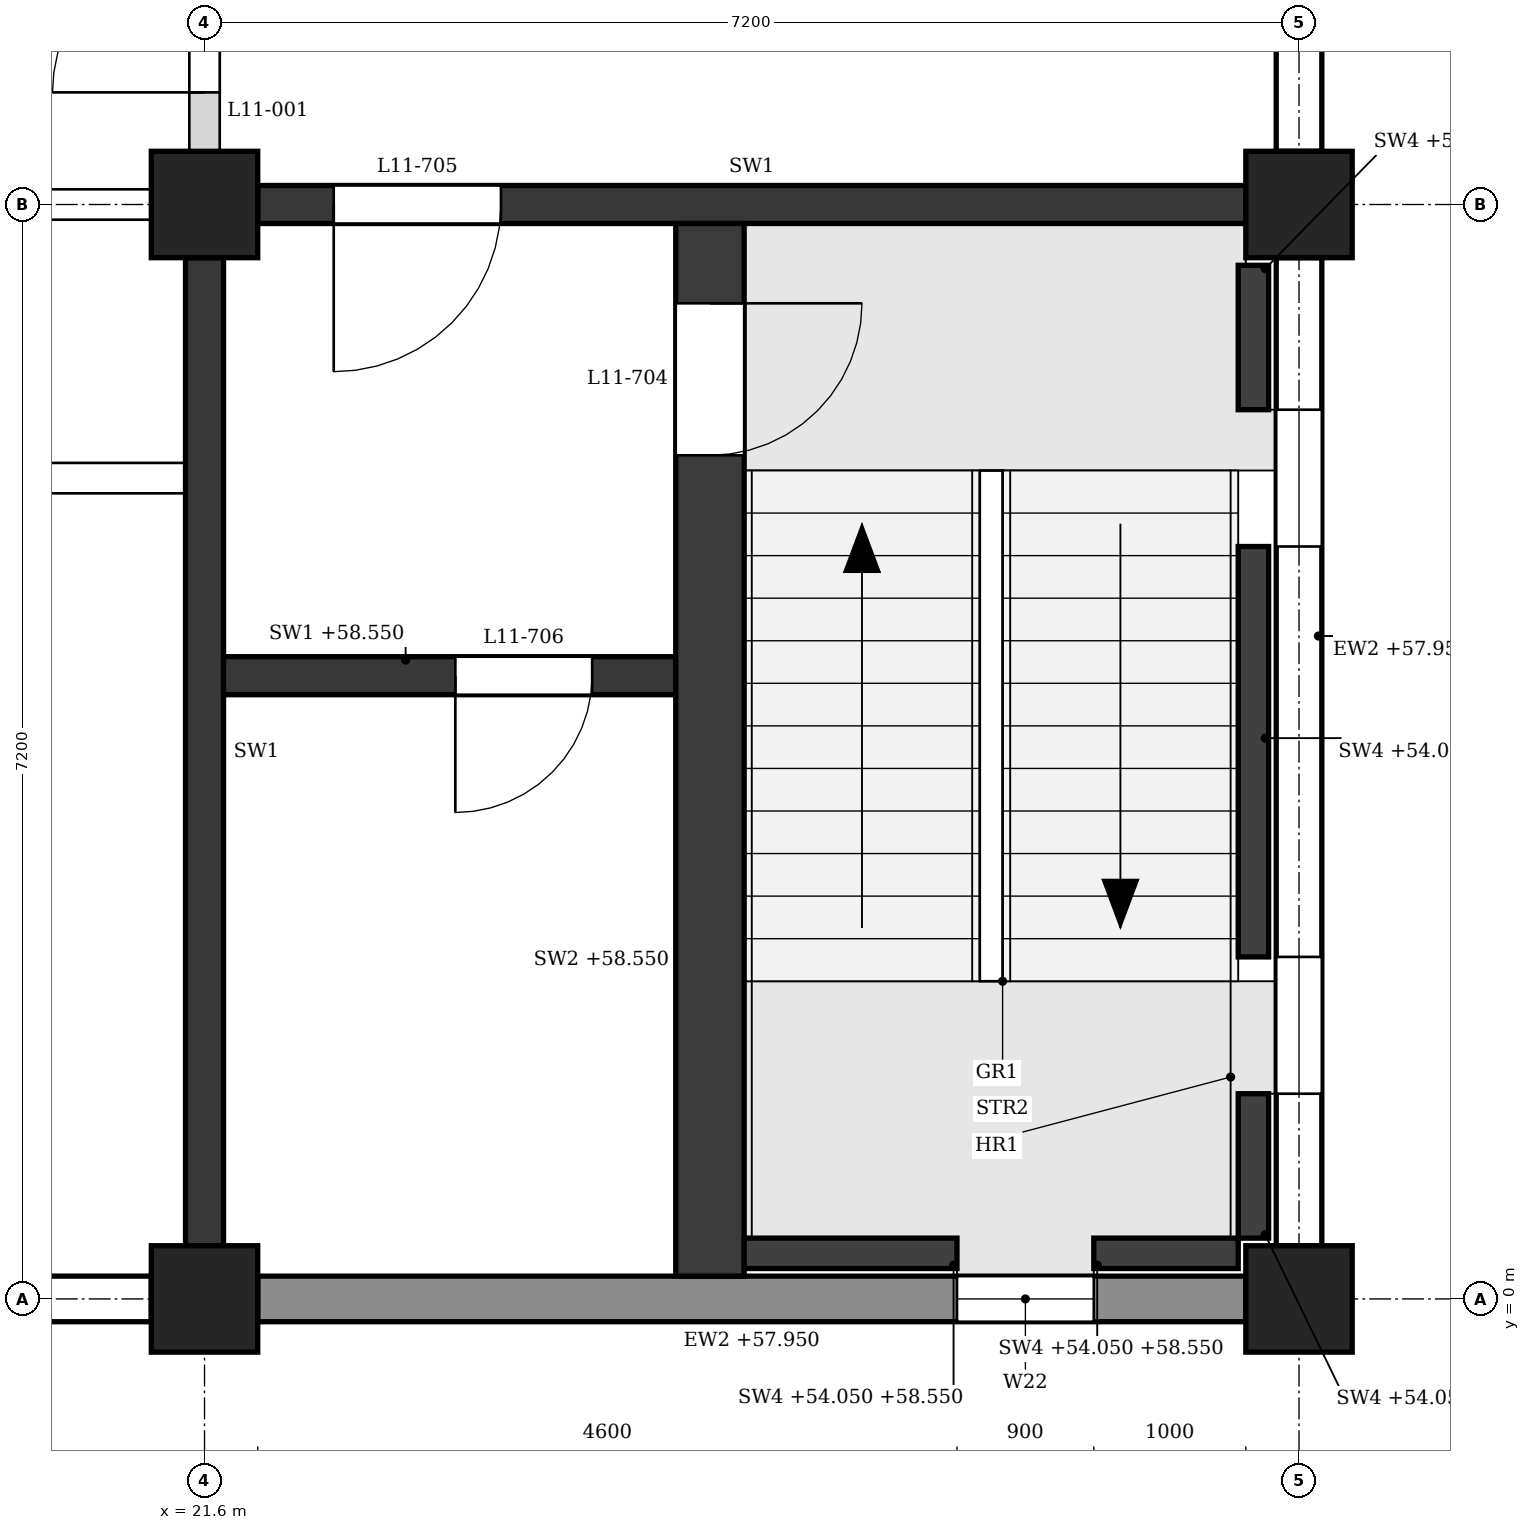
"""IFC4 building model, lengths in metres.
Left out: names, types, materials, properties, quantities, classifications, styles, units other than length and angle.
Written with IfcOpenShell. Run it as: python <this file> out.ifc"""

import sys

from ifc_helpers import new_model, si_unit, direction, frame, frame_2d, origin, origin_2d, place, context, subcontext, project, spatial, polyline, rectangle, outline, extrude, element, fill, save


model = new_model("IFC4")
c1 = context("Model", 3, precision=1e-05, world=origin(), true_north=direction((0.0, 1.0)))
c2 = subcontext(c1, "Body", "Model", "MODEL_VIEW")
j1 = project(units=[si_unit("LENGTHUNIT", "METRE"), si_unit("PLANEANGLEUNIT", "RADIAN")], contexts=[c1])
p1 = place(None, origin())
s1 = spatial("IfcSite", under=j1, at=p1, CompositionType="ELEMENT")
p2 = place(p1, origin())
s2 = spatial("IfcBuilding", under=s1, at=p2, CompositionType="ELEMENT")
p3 = place(p2, frame((0.0, 0.0, 54.3)))
s3 = spatial("IfcBuildingStorey", under=s2, at=p3, CompositionType="ELEMENT", Elevation=54.3)
for number, where, z_axis, x_axis in (
    (1, (21.6, 0.0, 0.0), (0.0, 0.0, 1.0), (1.0, 0.0, 0.0)),
    (2, (21.6, 7.2, 0.0), (0.0, 0.0, 1.0), (1.0, 0.0, 0.0)),
    (3, (28.8, 0.0, 0.0), (0.0, 0.0, 1.0), (1.0, 0.0, 0.0)),
    (4, (28.8, 7.2, 0.0), (0.0, 0.0, 1.0), (1.0, 0.0, 0.0)),
):
    element("IfcColumn", number, at=place(p3, frame(where, z_axis=z_axis, x_axis=x_axis)), inside=s3, PredefinedType="COLUMN", context=c2, shape_type="SweptSolid", body=[
        extrude(rectangle(XDim=0.7, YDim=0.7, at=origin_2d()), origin(), (0.0, 0.0, 1.0), 4.5),
    ])
p4 = place(p3, frame((14.75, 0.0, 0.0), z_axis=(0.0, 0.0, 1.0), x_axis=(1.0, 0.0, 0.0)))
e5 = element("IfcWall", 5, at=p4, inside=s3, PredefinedType="STANDARD", context=c2, shape_type="SweptSolid", body=[
    extrude(rectangle(XDim=6.5, YDim=0.3, at=frame_2d((3.25, 0.0))), origin(), (0.0, 0.0, 1.0), 3.65),
])
p5 = place(p4, frame((0.7, 0.0, 0.9)))
e6 = element("IfcOpeningElement", 6, at=p5, cuts=e5, PredefinedType="OPENING", context=c2, shape_type="SweptSolid", body=[
    extrude(outline(polyline([(0.0, 0.0), (1.5, 0.0), (1.5, 1.95), (0.75, 2.7), (0.0, 1.95), (0.0, 0.0)])), frame((0.0, 0.16, 0.0), z_axis=(0.0, -1.0, 0.0), x_axis=(1.0, 0.0, 0.0)), (0.0, 0.0, 1.0), 0.32),
])
p6 = place(p4, frame((4.3, 0.0, 0.9)))
e7 = element("IfcOpeningElement", 7, at=p6, cuts=e5, PredefinedType="OPENING", context=c2, shape_type="SweptSolid", body=[
    extrude(outline(polyline([(0.0, 0.0), (1.5, 0.0), (1.5, 1.95), (0.75, 2.7), (0.0, 1.95), (0.0, 0.0)])), frame((0.0, 0.16, 0.0), z_axis=(0.0, -1.0, 0.0), x_axis=(1.0, 0.0, 0.0)), (0.0, 0.0, 1.0), 0.32),
])
p7 = place(p3, frame((21.95, 0.0, 0.0), z_axis=(0.0, 0.0, 1.0), x_axis=(1.0, 0.0, 0.0)))
e8 = element("IfcWall", 8, at=p7, inside=s3, PredefinedType="STANDARD", context=c2, shape_type="SweptSolid", body=[
    extrude(rectangle(XDim=6.5, YDim=0.3, at=frame_2d((3.25, 0.0))), origin(), (0.0, 0.0, 1.0), 3.65),
])
p8 = place(p7, frame((4.6, 0.0, 0.9)))
e9 = element("IfcOpeningElement", 9, at=p8, cuts=e8, PredefinedType="OPENING", context=c2, shape_type="SweptSolid", body=[
    extrude(outline(polyline([(0.0, 0.0), (0.9, 0.0), (0.9, 2.25), (0.45, 2.7), (0.0, 2.25), (0.0, 0.0)])), frame((0.0, 0.16, 0.0), z_axis=(0.0, -1.0, 0.0), x_axis=(1.0, 0.0, 0.0)), (0.0, 0.0, 1.0), 0.32),
])
p9 = place(p3, frame((28.8, 0.35, 0.0), z_axis=(0.0, 0.0, 1.0), x_axis=(0.0, 1.0, 0.0)))
e10 = element("IfcWall", 10, at=p9, inside=s3, PredefinedType="STANDARD", context=c2, shape_type="SweptSolid", body=[
    extrude(rectangle(XDim=6.5, YDim=0.3, at=frame_2d((3.25, 0.0))), origin(), (0.0, 0.0, 1.0), 3.65),
])
p10 = place(p9, frame((1.0, 0.0, 0.9)))
e11 = element("IfcOpeningElement", 11, at=p10, cuts=e10, PredefinedType="OPENING", context=c2, shape_type="SweptSolid", body=[
    extrude(outline(polyline([(0.0, 0.0), (0.9, 0.0), (0.9, 2.25), (0.45, 2.7), (0.0, 2.25), (0.0, 0.0)])), frame((0.0, 0.16, 0.0), z_axis=(0.0, -1.0, 0.0), x_axis=(1.0, 0.0, 0.0)), (0.0, 0.0, 1.0), 0.32),
])
p11 = place(p9, frame((4.6, 0.0, 0.9)))
e12 = element("IfcOpeningElement", 12, at=p11, cuts=e10, PredefinedType="OPENING", context=c2, shape_type="SweptSolid", body=[
    extrude(outline(polyline([(0.0, 0.0), (0.9, 0.0), (0.9, 2.25), (0.45, 2.7), (0.0, 2.25), (0.0, 0.0)])), frame((0.0, 0.16, 0.0), z_axis=(0.0, -1.0, 0.0), x_axis=(1.0, 0.0, 0.0)), (0.0, 0.0, 1.0), 0.32),
])
p12 = place(p3, frame((28.8, 7.55, 0.0), z_axis=(0.0, 0.0, 1.0), x_axis=(0.0, 1.0, 0.0)))
e13 = element("IfcWall", 13, at=p12, inside=s3, PredefinedType="STANDARD", context=c2, shape_type="SweptSolid", body=[
    extrude(rectangle(XDim=6.5, YDim=0.3, at=frame_2d((3.25, 0.0))), origin(), (0.0, 0.0, 1.0), 3.65),
])
p13 = place(p12, frame((0.7, 0.0, 0.9)))
e14 = element("IfcOpeningElement", 14, at=p13, cuts=e13, PredefinedType="OPENING", context=c2, shape_type="SweptSolid", body=[
    extrude(outline(polyline([(0.0, 0.0), (1.5, 0.0), (1.5, 1.95), (0.75, 2.7), (0.0, 1.95), (0.0, 0.0)])), frame((0.0, 0.16, 0.0), z_axis=(0.0, -1.0, 0.0), x_axis=(1.0, 0.0, 0.0)), (0.0, 0.0, 1.0), 0.32),
])
p14 = place(p3, frame((21.95, 7.2, 0.0), z_axis=(0.0, 0.0, 1.0), x_axis=(1.0, 0.0, 0.0)))
e15 = element("IfcWall", 15, at=p14, inside=s3, PredefinedType="SHEAR", context=c2, shape_type="SweptSolid", body=[
    extrude(rectangle(XDim=6.5, YDim=0.25, at=frame_2d((3.25, 0.0))), origin(), (0.0, 0.0, 1.0), 3.55),
])
p15 = place(p14, frame((0.5, 0.0, 0.0)))
e16 = element("IfcOpeningElement", 16, at=p15, cuts=e15, PredefinedType="OPENING", context=c2, shape_type="SweptSolid", body=[
    extrude(rectangle(XDim=1.1, YDim=2.1, at=frame_2d((0.55, 1.05))), frame((0.0, 0.135, 0.0), z_axis=(0.0, -1.0, 0.0), x_axis=(1.0, 0.0, 0.0)), (0.0, 0.0, 1.0), 0.27),
])
p16 = place(p3, frame((21.6, 0.35, 0.0), z_axis=(0.0, 0.0, 1.0), x_axis=(0.0, 1.0, 0.0)))
e17 = element("IfcWall", 17, at=p16, inside=s3, PredefinedType="SHEAR", context=c2, shape_type="SweptSolid", body=[
    extrude(rectangle(XDim=6.5, YDim=0.25, at=frame_2d((3.25, 0.0))), origin(), (0.0, 0.0, 1.0), 3.55),
])
p17 = place(p3, frame((28.5, 0.4, -0.25), z_axis=(0.0, 0.0, 1.0), x_axis=(0.0, 1.0, 0.0)))
e18 = element("IfcWall", 18, at=p17, inside=s3, PredefinedType="SHEAR", context=c2, shape_type="SweptSolid", body=[
    extrude(rectangle(XDim=0.95, YDim=0.2, at=frame_2d((0.475, 0.0))), origin(), (0.0, 0.0, 1.0), 4.5),
])
p18 = place(p3, frame((28.5, 2.25, -0.25), z_axis=(0.0, 0.0, 1.0), x_axis=(0.0, 1.0, 0.0)))
e19 = element("IfcWall", 19, at=p18, inside=s3, PredefinedType="SHEAR", context=c2, shape_type="SweptSolid", body=[
    extrude(rectangle(XDim=2.7, YDim=0.2, at=frame_2d((1.35, 0.0))), origin(), (0.0, 0.0, 1.0), 4.5),
])
p19 = place(p3, frame((28.5, 5.85, -0.25), z_axis=(0.0, 0.0, 1.0), x_axis=(0.0, 1.0, 0.0)))
e20 = element("IfcWall", 20, at=p19, inside=s3, PredefinedType="SHEAR", context=c2, shape_type="SweptSolid", body=[
    extrude(rectangle(XDim=0.95, YDim=0.2, at=frame_2d((0.475, 0.0))), origin(), (0.0, 0.0, 1.0), 4.5),
])
p20 = place(p3, frame((25.15, 0.3, -0.25), z_axis=(0.0, 0.0, 1.0), x_axis=(1.0, 0.0, 0.0)))
e21 = element("IfcWall", 21, at=p20, inside=s3, PredefinedType="SHEAR", context=c2, shape_type="SweptSolid", body=[
    extrude(rectangle(XDim=1.4, YDim=0.2, at=frame_2d((0.7, 0.0))), origin(), (0.0, 0.0, 1.0), 4.5),
])
p21 = place(p3, frame((27.45, 0.3, -0.25), z_axis=(0.0, 0.0, 1.0), x_axis=(1.0, 0.0, 0.0)))
e22 = element("IfcWall", 22, at=p21, inside=s3, PredefinedType="SHEAR", context=c2, shape_type="SweptSolid", body=[
    extrude(rectangle(XDim=0.95, YDim=0.2, at=frame_2d((0.475, 0.0))), origin(), (0.0, 0.0, 1.0), 4.5),
])
p22 = place(p3, frame((24.925, 0.15, 0.0), z_axis=(0.0, 0.0, 1.0), x_axis=(0.0, 1.0, 0.0)))
e23 = element("IfcWall", 23, at=p22, inside=s3, PredefinedType="SHEAR", context=c2, shape_type="SweptSolid", body=[
    extrude(rectangle(XDim=6.925, YDim=0.45, at=frame_2d((3.462, 0.0))), origin(), (0.0, 0.0, 1.0), 4.25),
])
p23 = place(p22, frame((5.4, 0.0, 0.0)))
e24 = element("IfcOpeningElement", 24, at=p23, cuts=e23, PredefinedType="OPENING", context=c2, shape_type="SweptSolid", body=[
    extrude(rectangle(XDim=1.0, YDim=2.1, at=frame_2d((0.5, 1.05))), frame((0.0, 0.235, 0.0), z_axis=(0.0, -1.0, 0.0), x_axis=(1.0, 0.0, 0.0)), (0.0, 0.0, 1.0), 0.47),
])
p24 = place(p3, frame((21.725, 4.1, 0.0), z_axis=(0.0, 0.0, 1.0), x_axis=(1.0, 0.0, 0.0)))
e25 = element("IfcWall", 25, at=p24, inside=s3, PredefinedType="SHEAR", context=c2, shape_type="SweptSolid", body=[
    extrude(rectangle(XDim=2.975, YDim=0.25, at=frame_2d((1.487, 0.0))), origin(), (0.0, 0.0, 1.0), 4.25),
])
p25 = place(p24, frame((1.525, 0.0, 0.0)))
e26 = element("IfcOpeningElement", 26, at=p25, cuts=e25, PredefinedType="OPENING", context=c2, shape_type="SweptSolid", body=[
    extrude(rectangle(XDim=0.9, YDim=2.1, at=frame_2d((0.45, 1.05))), frame((0.0, 0.135, 0.0), z_axis=(0.0, -1.0, 0.0), x_axis=(1.0, 0.0, 0.0)), (0.0, 0.0, 1.0), 0.27),
])
p26 = place(p3, frame((7.325, 5.4, 0.0), z_axis=(0.0, 0.0, 1.0), x_axis=(1.0, 0.0, 0.0)))
e27 = element("IfcWall", 27, at=p26, inside=s3, PredefinedType="PARTITIONING", context=c2, shape_type="SweptSolid", body=[
    extrude(outline(polyline([(0.0, 0.0), (14.15, 0.0), (14.15, 3.55), (14.05, 3.55), (14.05, 4.25), (7.3, 4.25), (7.3, 3.55), (6.85, 3.55), (6.85, 4.25), (0.1, 4.25), (0.1, 3.55), (0.0, 3.55), (0.0, 0.0)])), frame((0.0, 0.1, 0.0), z_axis=(0.0, -1.0, 0.0), x_axis=(1.0, 0.0, 0.0)), (0.0, 0.0, 1.0), 0.2),
])
p27 = place(p26, frame((1.238, 0.0, 0.0)))
e28 = element("IfcOpeningElement", 28, at=p27, cuts=e27, PredefinedType="OPENING", context=c2, shape_type="SweptSolid", body=[
    extrude(rectangle(XDim=1.0, YDim=2.1, at=frame_2d((0.5, 1.05))), frame((0.0, 0.11, 0.0), z_axis=(0.0, -1.0, 0.0), x_axis=(1.0, 0.0, 0.0)), (0.0, 0.0, 1.0), 0.22),
])
p28 = place(p26, frame((4.775, 0.0, 0.0)))
e29 = element("IfcOpeningElement", 29, at=p28, cuts=e27, PredefinedType="OPENING", context=c2, shape_type="SweptSolid", body=[
    extrude(rectangle(XDim=1.0, YDim=2.1, at=frame_2d((0.5, 1.05))), frame((0.0, 0.11, 0.0), z_axis=(0.0, -1.0, 0.0), x_axis=(1.0, 0.0, 0.0)), (0.0, 0.0, 1.0), 0.22),
])
p29 = place(p26, frame((8.375, 0.0, 0.0)))
e30 = element("IfcOpeningElement", 30, at=p29, cuts=e27, PredefinedType="OPENING", context=c2, shape_type="SweptSolid", body=[
    extrude(rectangle(XDim=1.0, YDim=2.1, at=frame_2d((0.5, 1.05))), frame((0.0, 0.11, 0.0), z_axis=(0.0, -1.0, 0.0), x_axis=(1.0, 0.0, 0.0)), (0.0, 0.0, 1.0), 0.22),
])
p30 = place(p26, frame((11.913, 0.0, 0.0)))
e31 = element("IfcOpeningElement", 31, at=p30, cuts=e27, PredefinedType="OPENING", context=c2, shape_type="SweptSolid", body=[
    extrude(rectangle(XDim=1.0, YDim=2.1, at=frame_2d((0.5, 1.05))), frame((0.0, 0.11, 0.0), z_axis=(0.0, -1.0, 0.0), x_axis=(1.0, 0.0, 0.0)), (0.0, 0.0, 1.0), 0.22),
])
p31 = place(p3, frame((14.75, 7.2, 0.0), z_axis=(0.0, 0.0, 1.0), x_axis=(1.0, 0.0, 0.0)))
e32 = element("IfcWall", 32, at=p31, inside=s3, PredefinedType="PARTITIONING", context=c2, shape_type="SweptSolid", body=[
    extrude(rectangle(XDim=6.5, YDim=0.2, at=frame_2d((3.25, 0.0))), origin(), (0.0, 0.0, 1.0), 3.55),
])
p32 = place(p31, frame((4.375, 0.0, 0.0)))
e33 = element("IfcOpeningElement", 33, at=p32, cuts=e32, PredefinedType="OPENING", context=c2, shape_type="SweptSolid", body=[
    extrude(rectangle(XDim=1.0, YDim=2.1, at=frame_2d((0.5, 1.05))), frame((0.0, 0.11, 0.0), z_axis=(0.0, -1.0, 0.0), x_axis=(1.0, 0.0, 0.0)), (0.0, 0.0, 1.0), 0.22),
])
p33 = place(p3, frame((21.6, 7.55, 0.0), z_axis=(0.0, 0.0, 1.0), x_axis=(0.0, 1.0, 0.0)))
e34 = element("IfcWall", 34, at=p33, inside=s3, PredefinedType="PARTITIONING", context=c2, shape_type="SweptSolid", body=[
    extrude(rectangle(XDim=2.775, YDim=0.2, at=frame_2d((1.387, 0.0))), origin(), (0.0, 0.0, 1.0), 3.55),
])
p34 = place(p33, frame((0.387, 0.0, 0.0)))
e35 = element("IfcOpeningElement", 35, at=p34, cuts=e34, PredefinedType="OPENING", context=c2, shape_type="SweptSolid", body=[
    extrude(rectangle(XDim=2.0, YDim=2.4, at=frame_2d((1.0, 1.2))), frame((0.0, 0.11, 0.0), z_axis=(0.0, -1.0, 0.0), x_axis=(1.0, 0.0, 0.0)), (0.0, 0.0, 1.0), 0.22),
])
p35 = place(p10, origin())
e36 = element("IfcWindow", 36, at=p35, inside=s3, PartitioningType="SINGLE_PANEL", PredefinedType="WINDOW", context=c2, shape_type="SweptSolid", body=[
    extrude(outline(polyline([(0.0, 0.0), (0.9, 0.0), (0.9, 2.25), (0.45, 2.7), (0.0, 2.25), (0.0, 0.0)])), frame((0.0, 0.03, 0.0), z_axis=(0.0, -1.0, 0.0), x_axis=(1.0, 0.0, 0.0)), (0.0, 0.0, 1.0), 0.06),
])
fill(e11, e36)
p36 = place(p11, origin())
e37 = element("IfcWindow", 37, at=p36, inside=s3, PartitioningType="SINGLE_PANEL", PredefinedType="WINDOW", context=c2, shape_type="SweptSolid", body=[
    extrude(outline(polyline([(0.0, 0.0), (0.9, 0.0), (0.9, 2.25), (0.45, 2.7), (0.0, 2.25), (0.0, 0.0)])), frame((0.0, 0.03, 0.0), z_axis=(0.0, -1.0, 0.0), x_axis=(1.0, 0.0, 0.0)), (0.0, 0.0, 1.0), 0.06),
])
fill(e12, e37)
p37 = place(p8, origin())
e38 = element("IfcWindow", 38, at=p37, inside=s3, PartitioningType="SINGLE_PANEL", PredefinedType="WINDOW", context=c2, shape_type="SweptSolid", body=[
    extrude(outline(polyline([(0.0, 0.0), (0.9, 0.0), (0.9, 2.25), (0.45, 2.7), (0.0, 2.25), (0.0, 0.0)])), frame((0.0, 0.03, 0.0), z_axis=(0.0, -1.0, 0.0), x_axis=(1.0, 0.0, 0.0)), (0.0, 0.0, 1.0), 0.06),
])
fill(e9, e38)
p38 = place(p23, frame((1.0, 0.0, 0.0), z_axis=(0.0, 0.0, 1.0), x_axis=(-1.0, 0.0, 0.0)))
e39 = element("IfcDoor", 39, at=p38, inside=s3, OperationType="SINGLE_SWING_LEFT", PredefinedType="DOOR", context=c2, shape_type="SweptSolid", body=[
    extrude(rectangle(XDim=1.0, YDim=2.1, at=frame_2d((0.5, 1.05))), frame((0.0, 0.025, 0.0), z_axis=(0.0, -1.0, 0.0), x_axis=(1.0, 0.0, 0.0)), (0.0, 0.0, 1.0), 0.05),
])
fill(e24, e39)
p39 = place(p15, frame((1.1, 0.0, 0.0), z_axis=(0.0, 0.0, 1.0), x_axis=(-1.0, 0.0, 0.0)))
e40 = element("IfcDoor", 40, at=p39, inside=s3, OperationType="SINGLE_SWING_RIGHT", PredefinedType="DOOR", context=c2, shape_type="SweptSolid", body=[
    extrude(rectangle(XDim=1.1, YDim=2.1, at=frame_2d((0.55, 1.05))), frame((0.0, 0.025, 0.0), z_axis=(0.0, -1.0, 0.0), x_axis=(1.0, 0.0, 0.0)), (0.0, 0.0, 1.0), 0.05),
])
fill(e16, e40)
p40 = place(p25, frame((0.9, 0.0, 0.0), z_axis=(0.0, 0.0, 1.0), x_axis=(-1.0, 0.0, 0.0)))
e41 = element("IfcDoor", 41, at=p40, inside=s3, OperationType="SINGLE_SWING_RIGHT", PredefinedType="DOOR", context=c2, shape_type="SweptSolid", body=[
    extrude(rectangle(XDim=0.9, YDim=2.1, at=frame_2d((0.45, 1.05))), frame((0.0, 0.025, 0.0), z_axis=(0.0, -1.0, 0.0), x_axis=(1.0, 0.0, 0.0)), (0.0, 0.0, 1.0), 0.05),
])
fill(e26, e41)
p41 = place(p34, origin())
e42 = element("IfcDoor", 42, at=p41, inside=s3, OperationType="DOUBLE_DOOR_SINGLE_SWING", PredefinedType="DOOR", context=c2, shape_type="SweptSolid", body=[
    extrude(rectangle(XDim=2.0, YDim=2.4, at=frame_2d((1.0, 1.2))), frame((0.0, 0.025, 0.0), z_axis=(0.0, -1.0, 0.0), x_axis=(1.0, 0.0, 0.0)), (0.0, 0.0, 1.0), 0.05),
])
fill(e35, e42)
save(model, sys.argv[1])
